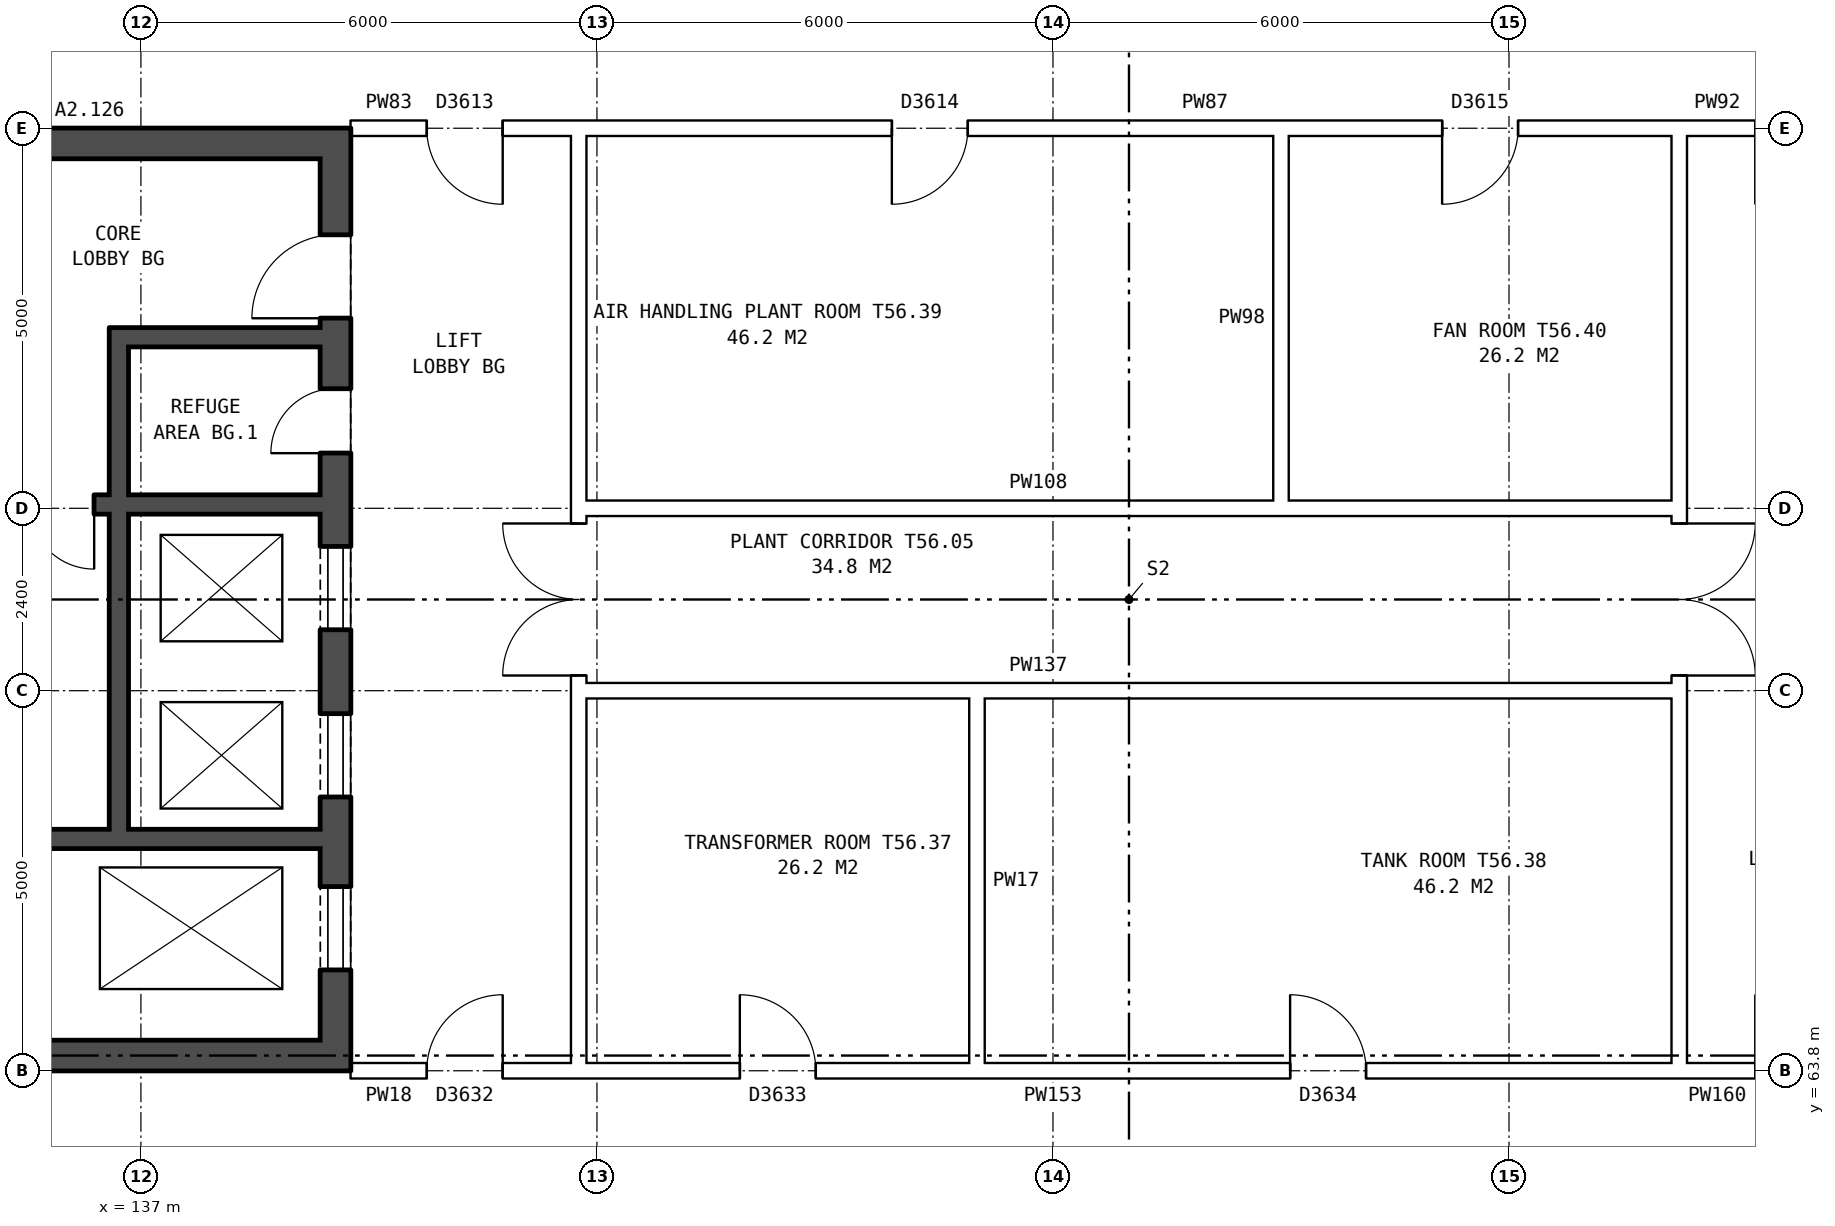
"""IFC4 building model, lengths in metres.
Left out: names, types, materials, properties, quantities, classifications, styles, units other than length and angle.
Written with IfcOpenShell. Run it as: python <this file> out.ifc"""

import sys

from ifc_helpers import new_model, si_unit, direction, frame, frame_2d, origin, place, context, subcontext, project, spatial, rectangle, extrude, element, fill, save


model = new_model("IFC4")
c1 = context("Model", 3, precision=1e-05, world=origin(), true_north=direction((0.0, 1.0)))
c2 = subcontext(c1, "Body", "Model", "MODEL_VIEW")
j1 = project(units=[si_unit("LENGTHUNIT", "METRE"), si_unit("PLANEANGLEUNIT", "RADIAN")], contexts=[c1])
p1 = place(None, origin())
s1 = spatial("IfcSite", under=j1, at=p1, CompositionType="ELEMENT")
p2 = place(p1, origin())
s2 = spatial("IfcBuilding", under=s1, at=p2, CompositionType="ELEMENT")
p3 = place(p2, frame((0.0, 0.0, 198.6)))
s3 = spatial("IfcBuildingStorey", under=s2, at=p3, CompositionType="ELEMENT", Elevation=198.6)
p4 = place(p3, frame((139.56, 63.8, 0.0), z_axis=(0.0, 0.0, 1.0), x_axis=(0.0, 1.0, 0.0)))
e1 = element("IfcWall", 1, at=p4, inside=s3, PredefinedType="SHEAR", context=c2, shape_type="SweptSolid", body=[
    extrude(rectangle(XDim=12.4, YDim=0.4, at=frame_2d((6.2, 0.0))), origin(), (0.0, 0.0, 1.0), 3.7),
])
p5 = place(p4, frame((1.325, 0.0, 0.0)))
e2 = element("IfcOpeningElement", 2, at=p5, cuts=e1, PredefinedType="OPENING", context=c2, shape_type="SweptSolid", body=[
    extrude(rectangle(XDim=1.1, YDim=2.1, at=frame_2d((0.55, 1.05))), frame((0.0, 0.21, 0.0), z_axis=(0.0, -1.0, 0.0), x_axis=(1.0, 0.0, 0.0)), (0.0, 0.0, 1.0), 0.42),
])
p6 = place(p4, frame((3.6, 0.0, 0.0)))
e3 = element("IfcOpeningElement", 3, at=p6, cuts=e1, PredefinedType="OPENING", context=c2, shape_type="SweptSolid", body=[
    extrude(rectangle(XDim=1.1, YDim=2.1, at=frame_2d((0.55, 1.05))), frame((0.0, 0.21, 0.0), z_axis=(0.0, -1.0, 0.0), x_axis=(1.0, 0.0, 0.0)), (0.0, 0.0, 1.0), 0.42),
])
p7 = place(p4, frame((5.8, 0.0, 0.0)))
e4 = element("IfcOpeningElement", 4, at=p7, cuts=e1, PredefinedType="OPENING", context=c2, shape_type="SweptSolid", body=[
    extrude(rectangle(XDim=1.1, YDim=2.1, at=frame_2d((0.55, 1.05))), frame((0.0, 0.21, 0.0), z_axis=(0.0, -1.0, 0.0), x_axis=(1.0, 0.0, 0.0)), (0.0, 0.0, 1.0), 0.42),
])
p8 = place(p4, frame((9.9, 0.0, 0.0)))
e5 = element("IfcOpeningElement", 5, at=p8, cuts=e1, PredefinedType="OPENING", context=c2, shape_type="SweptSolid", body=[
    extrude(rectangle(XDim=1.1, YDim=2.1, at=frame_2d((0.55, 1.05))), frame((0.0, 0.21, 0.0), z_axis=(0.0, -1.0, 0.0), x_axis=(1.0, 0.0, 0.0)), (0.0, 0.0, 1.0), 0.42),
])
p9 = place(p4, frame((8.125, 0.0, 0.0)))
e6 = element("IfcOpeningElement", 6, at=p9, cuts=e1, PredefinedType="OPENING", context=c2, shape_type="SweptSolid", body=[
    extrude(rectangle(XDim=0.85, YDim=2.1, at=frame_2d((0.425, 1.05))), frame((0.0, 0.21, 0.0), z_axis=(0.0, -1.0, 0.0), x_axis=(1.0, 0.0, 0.0)), (0.0, 0.0, 1.0), 0.42),
])
for number, where, z_axis, x_axis in (
    (7, (139.36, 64.0, 0.0), (0.0, 0.0, 1.0), (-1.0, 0.0, 0.0)),
    (8, (139.36, 76.0, 0.0), (0.0, 0.0, 1.0), (-1.0, 0.0, 0.0)),
):
    element("IfcWall", number, at=place(p3, frame(where, z_axis=z_axis, x_axis=x_axis)), inside=s3, PredefinedType="SHEAR", context=c2, shape_type="SweptSolid", body=[
        extrude(rectangle(XDim=7.6, YDim=0.4, at=frame_2d((3.8, 0.0))), origin(), (0.0, 0.0, 1.0), 3.7),
    ])
p10 = place(p3, frame((139.36, 66.85, 0.0), z_axis=(0.0, 0.0, 1.0), x_axis=(-1.0, 0.0, 0.0)))
e9 = element("IfcWall", 9, at=p10, inside=s3, PredefinedType="SHEAR", context=c2, shape_type="SweptSolid", body=[
    extrude(rectangle(XDim=4.775, YDim=0.25, at=frame_2d((2.388, 0.0))), origin(), (0.0, 0.0, 1.0), 3.7),
])
p11 = place(p3, frame((139.36, 71.25, 0.0), z_axis=(0.0, 0.0, 1.0), x_axis=(-1.0, 0.0, 0.0)))
e10 = element("IfcWall", 10, at=p11, inside=s3, PredefinedType="SHEAR", context=c2, shape_type="SweptSolid", body=[
    extrude(rectangle(XDim=7.6, YDim=0.25, at=frame_2d((3.8, 0.0))), origin(), (0.0, 0.0, 1.0), 3.7),
])
p12 = place(p11, frame((5.175, 0.0, 0.0)))
e11 = element("IfcOpeningElement", 11, at=p12, cuts=e10, PredefinedType="OPENING", context=c2, shape_type="SweptSolid", body=[
    extrude(rectangle(XDim=1.1, YDim=2.1, at=frame_2d((0.55, 1.05))), frame((0.0, 0.135, 0.0), z_axis=(0.0, -1.0, 0.0), x_axis=(1.0, 0.0, 0.0)), (0.0, 0.0, 1.0), 0.27),
])
p13 = place(p11, frame((2.975, 0.0, 0.0)))
e12 = element("IfcOpeningElement", 12, at=p13, cuts=e10, PredefinedType="OPENING", context=c2, shape_type="SweptSolid", body=[
    extrude(rectangle(XDim=0.85, YDim=2.1, at=frame_2d((0.425, 1.05))), frame((0.0, 0.135, 0.0), z_axis=(0.0, -1.0, 0.0), x_axis=(1.0, 0.0, 0.0)), (0.0, 0.0, 1.0), 0.27),
])
p14 = place(p3, frame((139.36, 73.45, 0.0), z_axis=(0.0, 0.0, 1.0), x_axis=(-1.0, 0.0, 0.0)))
e13 = element("IfcWall", 13, at=p14, inside=s3, PredefinedType="SHEAR", context=c2, shape_type="SweptSolid", body=[
    extrude(rectangle(XDim=2.525, YDim=0.25, at=frame_2d((1.263, 0.0))), origin(), (0.0, 0.0, 1.0), 3.7),
])
p15 = place(p3, frame((136.71, 66.975, 0.0), z_axis=(0.0, 0.0, 1.0), x_axis=(0.0, 1.0, 0.0)))
e14 = element("IfcWall", 14, at=p15, inside=s3, PredefinedType="SHEAR", context=c2, shape_type="SweptSolid", body=[
    extrude(rectangle(XDim=4.15, YDim=0.25, at=frame_2d((2.075, 0.0))), origin(), (0.0, 0.0, 1.0), 3.7),
])
p16 = place(p3, frame((136.71, 71.375, 0.0), z_axis=(0.0, 0.0, 1.0), x_axis=(0.0, 1.0, 0.0)))
e15 = element("IfcWall", 15, at=p16, inside=s3, PredefinedType="SHEAR", context=c2, shape_type="SweptSolid", body=[
    extrude(rectangle(XDim=2.2, YDim=0.25, at=frame_2d((1.1, 0.0))), origin(), (0.0, 0.0, 1.0), 3.7),
])
p17 = place(p3, frame((142.76, 63.9, 0.0), z_axis=(0.0, 0.0, 1.0), x_axis=(0.0, 1.0, 0.0)))
e16 = element("IfcWall", 16, at=p17, inside=s3, PredefinedType="PARTITIONING", context=c2, shape_type="SweptSolid", body=[
    extrude(rectangle(XDim=12.2, YDim=0.2, at=frame_2d((6.1, 0.0))), origin(), (0.0, 0.0, 1.0), 3.7),
])
p18 = place(p17, frame((5.1, 0.0, 0.0)))
e17 = element("IfcOpeningElement", 17, at=p18, cuts=e16, PredefinedType="OPENING", context=c2, shape_type="SweptSolid", body=[
    extrude(rectangle(XDim=2.0, YDim=2.1, at=frame_2d((1.0, 1.05))), frame((0.0, 0.11, 0.0), z_axis=(0.0, -1.0, 0.0), x_axis=(1.0, 0.0, 0.0)), (0.0, 0.0, 1.0), 0.22),
])
p19 = place(p3, frame((157.24, 63.9, 0.0), z_axis=(0.0, 0.0, 1.0), x_axis=(0.0, 1.0, 0.0)))
e18 = element("IfcWall", 18, at=p19, inside=s3, PredefinedType="PARTITIONING", context=c2, shape_type="SweptSolid", body=[
    extrude(rectangle(XDim=12.2, YDim=0.2, at=frame_2d((6.1, 0.0))), origin(), (0.0, 0.0, 1.0), 3.7),
])
p20 = place(p19, frame((5.1, 0.0, 0.0)))
e19 = element("IfcOpeningElement", 19, at=p20, cuts=e18, PredefinedType="OPENING", context=c2, shape_type="SweptSolid", body=[
    extrude(rectangle(XDim=2.0, YDim=2.1, at=frame_2d((1.0, 1.05))), frame((0.0, 0.11, 0.0), z_axis=(0.0, -1.0, 0.0), x_axis=(1.0, 0.0, 0.0)), (0.0, 0.0, 1.0), 0.22),
])
p21 = place(p3, frame((142.76, 63.8, 0.0), z_axis=(0.0, 0.0, 1.0), x_axis=(1.0, 0.0, 0.0)))
e20 = element("IfcWall", 20, at=p21, inside=s3, PredefinedType="PARTITIONING", context=c2, shape_type="SweptSolid", body=[
    extrude(rectangle(XDim=14.48, YDim=0.2, at=frame_2d((7.24, 0.0))), origin(), (0.0, 0.0, 1.0), 3.7),
])
p22 = place(p21, frame((2.12, 0.0, 0.0)))
e21 = element("IfcOpeningElement", 21, at=p22, cuts=e20, PredefinedType="OPENING", context=c2, shape_type="SweptSolid", body=[
    extrude(rectangle(XDim=1.0, YDim=2.1, at=frame_2d((0.5, 1.05))), frame((0.0, 0.11, 0.0), z_axis=(0.0, -1.0, 0.0), x_axis=(1.0, 0.0, 0.0)), (0.0, 0.0, 1.0), 0.22),
])
p23 = place(p21, frame((9.36, 0.0, 0.0)))
e22 = element("IfcOpeningElement", 22, at=p23, cuts=e20, PredefinedType="OPENING", context=c2, shape_type="SweptSolid", body=[
    extrude(rectangle(XDim=1.0, YDim=2.1, at=frame_2d((0.5, 1.05))), frame((0.0, 0.11, 0.0), z_axis=(0.0, -1.0, 0.0), x_axis=(1.0, 0.0, 0.0)), (0.0, 0.0, 1.0), 0.22),
])
p24 = place(p3, frame((139.76, 63.8, 0.0), z_axis=(0.0, 0.0, 1.0), x_axis=(1.0, 0.0, 0.0)))
e23 = element("IfcWall", 23, at=p24, inside=s3, PredefinedType="PARTITIONING", context=c2, shape_type="SweptSolid", body=[
    extrude(rectangle(XDim=3.0, YDim=0.2, at=frame_2d((1.5, 0.0))), origin(), (0.0, 0.0, 1.0), 3.7),
])
p25 = place(p24, frame((1.0, 0.0, 0.0)))
e24 = element("IfcOpeningElement", 24, at=p25, cuts=e23, PredefinedType="OPENING", context=c2, shape_type="SweptSolid", body=[
    extrude(rectangle(XDim=1.0, YDim=2.1, at=frame_2d((0.5, 1.05))), frame((0.0, 0.11, 0.0), z_axis=(0.0, -1.0, 0.0), x_axis=(1.0, 0.0, 0.0)), (0.0, 0.0, 1.0), 0.22),
])
p26 = place(p3, frame((157.24, 63.8, 0.0), z_axis=(0.0, 0.0, 1.0), x_axis=(1.0, 0.0, 0.0)))
e25 = element("IfcWall", 25, at=p26, inside=s3, PredefinedType="PARTITIONING", context=c2, shape_type="SweptSolid", body=[
    extrude(rectangle(XDim=3.0, YDim=0.2, at=frame_2d((1.5, 0.0))), origin(), (0.0, 0.0, 1.0), 3.7),
])
p27 = place(p26, frame((1.0, 0.0, 0.0)))
e26 = element("IfcOpeningElement", 26, at=p27, cuts=e25, PredefinedType="OPENING", context=c2, shape_type="SweptSolid", body=[
    extrude(rectangle(XDim=1.0, YDim=2.1, at=frame_2d((0.5, 1.05))), frame((0.0, 0.11, 0.0), z_axis=(0.0, -1.0, 0.0), x_axis=(1.0, 0.0, 0.0)), (0.0, 0.0, 1.0), 0.22),
])
for number, where, z_axis, x_axis in (
    (27, (142.76, 68.8, 0.0), (0.0, 0.0, 1.0), (1.0, 0.0, 0.0)),
    (28, (142.76, 71.2, 0.0), (0.0, 0.0, 1.0), (1.0, 0.0, 0.0)),
):
    element("IfcWall", number, at=place(p3, frame(where, z_axis=z_axis, x_axis=x_axis)), inside=s3, PredefinedType="PARTITIONING", context=c2, shape_type="SweptSolid", body=[
        extrude(rectangle(XDim=14.48, YDim=0.2, at=frame_2d((7.24, 0.0))), origin(), (0.0, 0.0, 1.0), 3.7),
    ])
p28 = place(p3, frame((142.76, 76.2, 0.0), z_axis=(0.0, 0.0, 1.0), x_axis=(1.0, 0.0, 0.0)))
e29 = element("IfcWall", 29, at=p28, inside=s3, PredefinedType="PARTITIONING", context=c2, shape_type="SweptSolid", body=[
    extrude(rectangle(XDim=14.48, YDim=0.2, at=frame_2d((7.24, 0.0))), origin(), (0.0, 0.0, 1.0), 3.7),
])
p29 = place(p28, frame((4.12, 0.0, 0.0)))
e30 = element("IfcOpeningElement", 30, at=p29, cuts=e29, PredefinedType="OPENING", context=c2, shape_type="SweptSolid", body=[
    extrude(rectangle(XDim=1.0, YDim=2.1, at=frame_2d((0.5, 1.05))), frame((0.0, 0.11, 0.0), z_axis=(0.0, -1.0, 0.0), x_axis=(1.0, 0.0, 0.0)), (0.0, 0.0, 1.0), 0.22),
])
p30 = place(p28, frame((11.36, 0.0, 0.0)))
e31 = element("IfcOpeningElement", 31, at=p30, cuts=e29, PredefinedType="OPENING", context=c2, shape_type="SweptSolid", body=[
    extrude(rectangle(XDim=1.0, YDim=2.1, at=frame_2d((0.5, 1.05))), frame((0.0, 0.11, 0.0), z_axis=(0.0, -1.0, 0.0), x_axis=(1.0, 0.0, 0.0)), (0.0, 0.0, 1.0), 0.22),
])
p31 = place(p3, frame((139.76, 76.2, 0.0), z_axis=(0.0, 0.0, 1.0), x_axis=(1.0, 0.0, 0.0)))
e32 = element("IfcWall", 32, at=p31, inside=s3, PredefinedType="PARTITIONING", context=c2, shape_type="SweptSolid", body=[
    extrude(rectangle(XDim=3.0, YDim=0.2, at=frame_2d((1.5, 0.0))), origin(), (0.0, 0.0, 1.0), 3.7),
])
p32 = place(p31, frame((1.0, 0.0, 0.0)))
e33 = element("IfcOpeningElement", 33, at=p32, cuts=e32, PredefinedType="OPENING", context=c2, shape_type="SweptSolid", body=[
    extrude(rectangle(XDim=1.0, YDim=2.1, at=frame_2d((0.5, 1.05))), frame((0.0, 0.11, 0.0), z_axis=(0.0, -1.0, 0.0), x_axis=(1.0, 0.0, 0.0)), (0.0, 0.0, 1.0), 0.22),
])
p33 = place(p3, frame((157.24, 76.2, 0.0), z_axis=(0.0, 0.0, 1.0), x_axis=(1.0, 0.0, 0.0)))
e34 = element("IfcWall", 34, at=p33, inside=s3, PredefinedType="PARTITIONING", context=c2, shape_type="SweptSolid", body=[
    extrude(rectangle(XDim=3.0, YDim=0.2, at=frame_2d((1.5, 0.0))), origin(), (0.0, 0.0, 1.0), 3.7),
])
p34 = place(p33, frame((1.0, 0.0, 0.0)))
e35 = element("IfcOpeningElement", 35, at=p34, cuts=e34, PredefinedType="OPENING", context=c2, shape_type="SweptSolid", body=[
    extrude(rectangle(XDim=1.0, YDim=2.1, at=frame_2d((0.5, 1.05))), frame((0.0, 0.11, 0.0), z_axis=(0.0, -1.0, 0.0), x_axis=(1.0, 0.0, 0.0)), (0.0, 0.0, 1.0), 0.22),
])
for number, where, z_axis, x_axis in (
    (36, (148.0, 63.7, 0.0), (0.0, 0.0, 1.0), (0.0, 1.0, 0.0)),
    (37, (152.0, 71.1, 0.0), (0.0, 0.0, 1.0), (0.0, 1.0, 0.0)),
):
    element("IfcWall", number, at=place(p3, frame(where, z_axis=z_axis, x_axis=x_axis)), inside=s3, PredefinedType="PARTITIONING", context=c2, shape_type="SweptSolid", body=[
        extrude(rectangle(XDim=5.2, YDim=0.2, at=frame_2d((2.6, 0.0))), origin(), (0.0, 0.0, 1.0), 3.7),
    ])
p35 = place(p5, origin())
e38 = element("IfcDoor", 38, at=p35, inside=s3, OperationType="DOUBLE_DOOR_SLIDING", PredefinedType="DOOR", context=c2, shape_type="SweptSolid", body=[
    extrude(rectangle(XDim=1.1, YDim=2.1, at=frame_2d((0.55, 1.05))), frame((0.0, 0.185, 0.0), z_axis=(0.0, -1.0, 0.0), x_axis=(1.0, 0.0, 0.0)), (0.0, 0.0, 1.0), 0.05),
])
fill(e2, e38)
p36 = place(p6, origin())
e39 = element("IfcDoor", 39, at=p36, inside=s3, OperationType="DOUBLE_DOOR_SLIDING", PredefinedType="DOOR", context=c2, shape_type="SweptSolid", body=[
    extrude(rectangle(XDim=1.1, YDim=2.1, at=frame_2d((0.55, 1.05))), frame((0.0, 0.185, 0.0), z_axis=(0.0, -1.0, 0.0), x_axis=(1.0, 0.0, 0.0)), (0.0, 0.0, 1.0), 0.05),
])
fill(e3, e39)
p37 = place(p7, origin())
e40 = element("IfcDoor", 40, at=p37, inside=s3, OperationType="DOUBLE_DOOR_SLIDING", PredefinedType="DOOR", context=c2, shape_type="SweptSolid", body=[
    extrude(rectangle(XDim=1.1, YDim=2.1, at=frame_2d((0.55, 1.05))), frame((0.0, 0.185, 0.0), z_axis=(0.0, -1.0, 0.0), x_axis=(1.0, 0.0, 0.0)), (0.0, 0.0, 1.0), 0.05),
])
fill(e4, e40)
p38 = place(p8, origin())
e41 = element("IfcDoor", 41, at=p38, inside=s3, OperationType="SINGLE_SWING_LEFT", PredefinedType="DOOR", context=c2, shape_type="SweptSolid", body=[
    extrude(rectangle(XDim=1.1, YDim=2.1, at=frame_2d((0.55, 1.05))), frame((0.0, 0.185, 0.0), z_axis=(0.0, -1.0, 0.0), x_axis=(1.0, 0.0, 0.0)), (0.0, 0.0, 1.0), 0.05),
])
fill(e5, e41)
p39 = place(p9, origin())
e42 = element("IfcDoor", 42, at=p39, inside=s3, OperationType="SINGLE_SWING_LEFT", PredefinedType="DOOR", context=c2, shape_type="SweptSolid", body=[
    extrude(rectangle(XDim=0.85, YDim=2.1, at=frame_2d((0.425, 1.05))), frame((0.0, 0.185, 0.0), z_axis=(0.0, -1.0, 0.0), x_axis=(1.0, 0.0, 0.0)), (0.0, 0.0, 1.0), 0.05),
])
fill(e6, e42)
p40 = place(p13, origin())
e43 = element("IfcDoor", 43, at=p40, inside=s3, OperationType="SINGLE_SWING_LEFT", PredefinedType="DOOR", context=c2, shape_type="SweptSolid", body=[
    extrude(rectangle(XDim=0.85, YDim=2.1, at=frame_2d((0.425, 1.05))), frame((0.0, 0.025, 0.0), z_axis=(0.0, -1.0, 0.0), x_axis=(1.0, 0.0, 0.0)), (0.0, 0.0, 1.0), 0.05),
])
fill(e12, e43)
p41 = place(p18, origin())
e44 = element("IfcDoor", 44, at=p41, inside=s3, OperationType="DOUBLE_DOOR_SINGLE_SWING", PredefinedType="DOOR", context=c2, shape_type="SweptSolid", body=[
    extrude(rectangle(XDim=2.0, YDim=2.1, at=frame_2d((1.0, 1.05))), frame((0.0, 0.025, 0.0), z_axis=(0.0, -1.0, 0.0), x_axis=(1.0, 0.0, 0.0)), (0.0, 0.0, 1.0), 0.05),
])
fill(e17, e44)
p42 = place(p20, frame((2.0, 0.0, 0.0), z_axis=(0.0, 0.0, 1.0), x_axis=(-1.0, 0.0, 0.0)))
e45 = element("IfcDoor", 45, at=p42, inside=s3, OperationType="DOUBLE_DOOR_SINGLE_SWING", PredefinedType="DOOR", context=c2, shape_type="SweptSolid", body=[
    extrude(rectangle(XDim=2.0, YDim=2.1, at=frame_2d((1.0, 1.05))), frame((0.0, 0.025, 0.0), z_axis=(0.0, -1.0, 0.0), x_axis=(1.0, 0.0, 0.0)), (0.0, 0.0, 1.0), 0.05),
])
fill(e19, e45)
p43 = place(p22, origin())
e46 = element("IfcDoor", 46, at=p43, inside=s3, OperationType="SINGLE_SWING_LEFT", PredefinedType="DOOR", context=c2, shape_type="SweptSolid", body=[
    extrude(rectangle(XDim=1.0, YDim=2.1, at=frame_2d((0.5, 1.05))), frame((0.0, 0.025, 0.0), z_axis=(0.0, -1.0, 0.0), x_axis=(1.0, 0.0, 0.0)), (0.0, 0.0, 1.0), 0.05),
])
fill(e21, e46)
p44 = place(p23, origin())
e47 = element("IfcDoor", 47, at=p44, inside=s3, OperationType="SINGLE_SWING_LEFT", PredefinedType="DOOR", context=c2, shape_type="SweptSolid", body=[
    extrude(rectangle(XDim=1.0, YDim=2.1, at=frame_2d((0.5, 1.05))), frame((0.0, 0.025, 0.0), z_axis=(0.0, -1.0, 0.0), x_axis=(1.0, 0.0, 0.0)), (0.0, 0.0, 1.0), 0.05),
])
fill(e22, e47)
p45 = place(p25, origin())
e48 = element("IfcDoor", 48, at=p45, inside=s3, OperationType="SINGLE_SWING_RIGHT", PredefinedType="DOOR", context=c2, shape_type="SweptSolid", body=[
    extrude(rectangle(XDim=1.0, YDim=2.1, at=frame_2d((0.5, 1.05))), frame((0.0, 0.025, 0.0), z_axis=(0.0, -1.0, 0.0), x_axis=(1.0, 0.0, 0.0)), (0.0, 0.0, 1.0), 0.05),
])
fill(e24, e48)
p46 = place(p29, frame((1.0, 0.0, 0.0), z_axis=(0.0, 0.0, 1.0), x_axis=(-1.0, 0.0, 0.0)))
e49 = element("IfcDoor", 49, at=p46, inside=s3, OperationType="SINGLE_SWING_RIGHT", PredefinedType="DOOR", context=c2, shape_type="SweptSolid", body=[
    extrude(rectangle(XDim=1.0, YDim=2.1, at=frame_2d((0.5, 1.05))), frame((0.0, 0.025, 0.0), z_axis=(0.0, -1.0, 0.0), x_axis=(1.0, 0.0, 0.0)), (0.0, 0.0, 1.0), 0.05),
])
fill(e30, e49)
p47 = place(p30, frame((1.0, 0.0, 0.0), z_axis=(0.0, 0.0, 1.0), x_axis=(-1.0, 0.0, 0.0)))
e50 = element("IfcDoor", 50, at=p47, inside=s3, OperationType="SINGLE_SWING_RIGHT", PredefinedType="DOOR", context=c2, shape_type="SweptSolid", body=[
    extrude(rectangle(XDim=1.0, YDim=2.1, at=frame_2d((0.5, 1.05))), frame((0.0, 0.025, 0.0), z_axis=(0.0, -1.0, 0.0), x_axis=(1.0, 0.0, 0.0)), (0.0, 0.0, 1.0), 0.05),
])
fill(e31, e50)
p48 = place(p32, frame((1.0, 0.0, 0.0), z_axis=(0.0, 0.0, 1.0), x_axis=(-1.0, 0.0, 0.0)))
e51 = element("IfcDoor", 51, at=p48, inside=s3, OperationType="SINGLE_SWING_LEFT", PredefinedType="DOOR", context=c2, shape_type="SweptSolid", body=[
    extrude(rectangle(XDim=1.0, YDim=2.1, at=frame_2d((0.5, 1.05))), frame((0.0, 0.025, 0.0), z_axis=(0.0, -1.0, 0.0), x_axis=(1.0, 0.0, 0.0)), (0.0, 0.0, 1.0), 0.05),
])
fill(e33, e51)
save(model, sys.argv[1])
